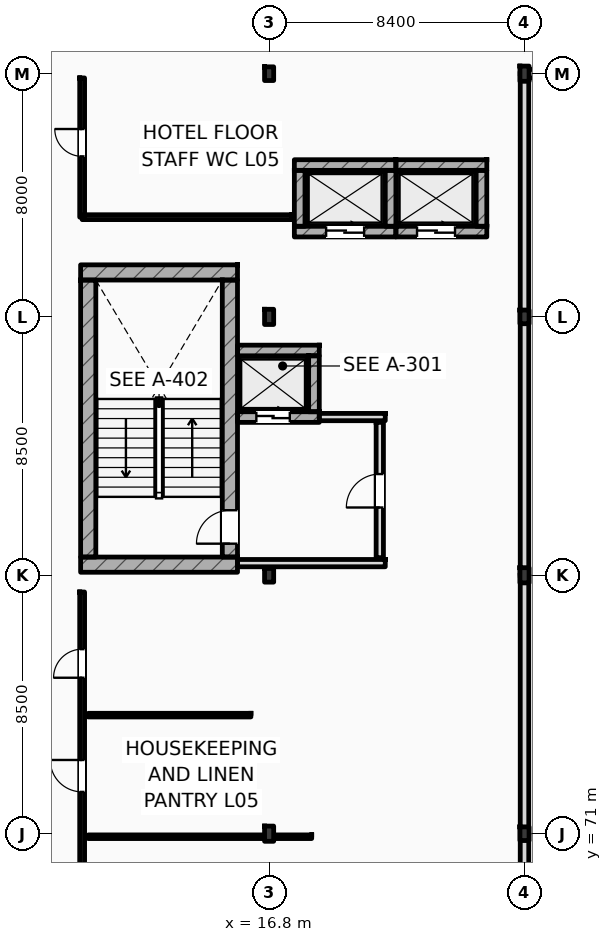
"""IFC4 building model, lengths in metres.
Left out: names, types, materials, properties, quantities, classifications, styles, units other than length and angle.
Written with IfcOpenShell. Run it as: python <this file> out.ifc"""

import sys

from ifc_helpers import new_model, si_unit, direction, frame, frame_2d, origin, origin_2d, place, context, subcontext, project, spatial, rectangle, i_section, extrude, element, fill, save


model = new_model("IFC4")
c1 = context("Model", 3, precision=1e-05, world=origin(), true_north=direction((0.0, 1.0)))
c2 = subcontext(c1, "Body", "Model", "MODEL_VIEW")
j1 = project(units=[si_unit("LENGTHUNIT", "METRE"), si_unit("PLANEANGLEUNIT", "RADIAN")], contexts=[c1])
p1 = place(None, origin())
s1 = spatial("IfcSite", under=j1, at=p1, CompositionType="ELEMENT")
p2 = place(p1, origin())
s2 = spatial("IfcBuilding", under=s1, at=p2, CompositionType="ELEMENT")
p3 = place(p2, frame((0.0, 0.0, 24.6)))
s3 = spatial("IfcBuildingStorey", under=s2, at=p3, CompositionType="ELEMENT", Elevation=24.6)
p4 = place(p3, frame((16.8, 71.0, 0.0), z_axis=(0.0, 0.0, 1.0), x_axis=(1.0, 0.0, 0.0)))
e1 = element("IfcColumn", 1, at=p4, inside=s3, PredefinedType="COLUMN", context=c2, shape_type="SweptSolid", body=[
    extrude(i_section(OverallWidth=0.3, OverallDepth=0.5, WebThickness=0.014, FlangeThickness=0.028, FilletRadius=0.027, at=origin_2d()), origin(), (0.0, 0.0, 1.0), 3.6),
])
p5 = place(p3, frame((16.8, 79.5, 0.0), z_axis=(0.0, 0.0, 1.0), x_axis=(1.0, 0.0, 0.0)))
e2 = element("IfcColumn", 2, at=p5, inside=s3, PredefinedType="COLUMN", context=c2, shape_type="SweptSolid", body=[
    extrude(i_section(OverallWidth=0.3, OverallDepth=0.45, WebThickness=0.014, FlangeThickness=0.026, FilletRadius=0.027, at=origin_2d()), origin(), (0.0, 0.0, 1.0), 3.6),
])
p6 = place(p3, frame((16.8, 88.0, 0.0), z_axis=(0.0, 0.0, 1.0), x_axis=(1.0, 0.0, 0.0)))
e3 = element("IfcColumn", 3, at=p6, inside=s3, PredefinedType="COLUMN", context=c2, shape_type="SweptSolid", body=[
    extrude(i_section(OverallWidth=0.3, OverallDepth=0.5, WebThickness=0.014, FlangeThickness=0.028, FilletRadius=0.027, at=origin_2d()), origin(), (0.0, 0.0, 1.0), 3.6),
])
for number, where, z_axis, x_axis in (
    (4, (16.8, 96.0, 0.0), (0.0, 0.0, 1.0), (1.0, 0.0, 0.0)),
    (5, (25.2, 71.0, 0.0), (0.0, 0.0, 1.0), (1.0, 0.0, 0.0)),
):
    element("IfcColumn", number, at=place(p3, frame(where, z_axis=z_axis, x_axis=x_axis)), inside=s3, PredefinedType="COLUMN", context=c2, shape_type="SweptSolid", body=[
        extrude(i_section(OverallWidth=0.3, OverallDepth=0.45, WebThickness=0.014, FlangeThickness=0.026, FilletRadius=0.027, at=origin_2d()), origin(), (0.0, 0.0, 1.0), 3.6),
    ])
p7 = place(p3, frame((25.2, 79.5, 0.0), z_axis=(0.0, 0.0, 1.0), x_axis=(1.0, 0.0, 0.0)))
e6 = element("IfcColumn", 6, at=p7, inside=s3, PredefinedType="COLUMN", context=c2, shape_type="SweptSolid", body=[
    extrude(i_section(OverallWidth=0.3, OverallDepth=0.5, WebThickness=0.014, FlangeThickness=0.028, FilletRadius=0.027, at=origin_2d()), origin(), (0.0, 0.0, 1.0), 3.6),
])
p8 = place(p3, frame((25.2, 88.0, 0.0), z_axis=(0.0, 0.0, 1.0), x_axis=(1.0, 0.0, 0.0)))
e7 = element("IfcColumn", 7, at=p8, inside=s3, PredefinedType="COLUMN", context=c2, shape_type="SweptSolid", body=[
    extrude(i_section(OverallWidth=0.3, OverallDepth=0.45, WebThickness=0.014, FlangeThickness=0.026, FilletRadius=0.027, at=origin_2d()), origin(), (0.0, 0.0, 1.0), 3.6),
])
p9 = place(p3, frame((25.2, 96.0, 0.0), z_axis=(0.0, 0.0, 1.0), x_axis=(1.0, 0.0, 0.0)))
e8 = element("IfcColumn", 8, at=p9, inside=s3, PredefinedType="COLUMN", context=c2, shape_type="SweptSolid", body=[
    extrude(i_section(OverallWidth=0.3, OverallDepth=0.5, WebThickness=0.014, FlangeThickness=0.028, FilletRadius=0.027, at=origin_2d()), origin(), (0.0, 0.0, 1.0), 3.6),
])
for number, where, z_axis, x_axis in (
    (9, (10.6, 89.462, 0.0), (0.0, 0.0, 1.0), (1.0, 0.0, 0.0)),
    (10, (10.6, 79.85, 0.0), (0.0, 0.0, 1.0), (1.0, 0.0, 0.0)),
):
    element("IfcWall", number, at=place(p3, frame(where, z_axis=z_axis, x_axis=x_axis)), inside=s3, PredefinedType="SHEAR", context=c2, shape_type="SweptSolid", body=[
        extrude(rectangle(XDim=5.16, YDim=0.5, at=frame_2d((2.58, 0.0))), origin(), (0.0, 0.0, 1.0), 3.6),
    ])
p10 = place(p3, frame((10.85, 80.1, 0.0), z_axis=(0.0, 0.0, 1.0), x_axis=(0.0, 1.0, 0.0)))
e11 = element("IfcWall", 11, at=p10, inside=s3, PredefinedType="SHEAR", context=c2, shape_type="SweptSolid", body=[
    extrude(rectangle(XDim=9.112, YDim=0.5, at=frame_2d((4.556, 0.0))), origin(), (0.0, 0.0, 1.0), 3.6),
])
p11 = place(p3, frame((15.51, 80.1, 0.0), z_axis=(0.0, 0.0, 1.0), x_axis=(0.0, 1.0, 0.0)))
e12 = element("IfcWall", 12, at=p11, inside=s3, PredefinedType="SHEAR", context=c2, shape_type="SweptSolid", body=[
    extrude(rectangle(XDim=9.112, YDim=0.5, at=frame_2d((4.556, 0.0))), origin(), (0.0, 0.0, 1.0), 3.6),
])
p12 = place(p11, frame((0.44, 0.0, 0.0)))
e13 = element("IfcOpeningElement", 13, at=p12, cuts=e12, PredefinedType="OPENING", context=c2, shape_type="SweptSolid", body=[
    extrude(rectangle(XDim=1.1, YDim=2.2, at=frame_2d((0.55, 1.1))), frame((0.0, 0.26, 0.0), z_axis=(0.0, -1.0, 0.0), x_axis=(1.0, 0.0, 0.0)), (0.0, 0.0, 1.0), 0.52),
])
p13 = place(p3, frame((25.2, 96.0, 0.0), z_axis=(0.0, 0.0, 1.0), x_axis=(1.0, 0.0, 0.0)))
e14 = element("IfcWall", 14, at=p13, inside=s3, PredefinedType="STANDARD", context=c2, shape_type="SweptSolid", body=[
    extrude(rectangle(XDim=94.8, YDim=0.28, at=frame_2d((47.4, 0.0))), origin(), (0.0, 0.0, 1.0), 2.78),
])
p14 = place(p13, frame((16.539, 0.0, 0.9)))
e15 = element("IfcOpeningElement", 15, at=p14, cuts=e14, PredefinedType="OPENING", context=c2, shape_type="SweptSolid", body=[
    extrude(rectangle(XDim=1.75, YDim=1.7, at=frame_2d((0.875, 0.85))), frame((0.0, 0.15, 0.0), z_axis=(0.0, -1.0, 0.0), x_axis=(1.0, 0.0, 0.0)), (0.0, 0.0, 1.0), 0.3),
])
p15 = place(p13, frame((20.367, 0.0, 0.9)))
e16 = element("IfcOpeningElement", 16, at=p15, cuts=e14, PredefinedType="OPENING", context=c2, shape_type="SweptSolid", body=[
    extrude(rectangle(XDim=2.0, YDim=1.7, at=frame_2d((1.0, 0.85))), frame((0.0, 0.15, 0.0), z_axis=(0.0, -1.0, 0.0), x_axis=(1.0, 0.0, 0.0)), (0.0, 0.0, 1.0), 0.3),
])
p16 = place(p13, frame((24.326, 0.0, 0.9)))
e17 = element("IfcOpeningElement", 17, at=p16, cuts=e14, PredefinedType="OPENING", context=c2, shape_type="SweptSolid", body=[
    extrude(rectangle(XDim=2.3, YDim=1.7, at=frame_2d((1.15, 0.85))), frame((0.0, 0.15, 0.0), z_axis=(0.0, -1.0, 0.0), x_axis=(1.0, 0.0, 0.0)), (0.0, 0.0, 1.0), 0.3),
])
p17 = place(p13, frame((27.684, 0.0, 0.9)))
e18 = element("IfcOpeningElement", 18, at=p17, cuts=e14, PredefinedType="OPENING", context=c2, shape_type="SweptSolid", body=[
    extrude(rectangle(XDim=2.6, YDim=1.7, at=frame_2d((1.3, 0.85))), frame((0.0, 0.15, 0.0), z_axis=(0.0, -1.0, 0.0), x_axis=(1.0, 0.0, 0.0)), (0.0, 0.0, 1.0), 0.3),
])
p18 = place(p13, frame((32.083, 0.0, 0.9)))
e19 = element("IfcOpeningElement", 19, at=p18, cuts=e14, PredefinedType="OPENING", context=c2, shape_type="SweptSolid", body=[
    extrude(rectangle(XDim=2.419, YDim=1.7, at=frame_2d((1.209, 0.85))), frame((0.0, 0.15, 0.0), z_axis=(0.0, -1.0, 0.0), x_axis=(1.0, 0.0, 0.0)), (0.0, 0.0, 1.0), 0.3),
])
p19 = place(p13, frame((35.322, 0.0, 0.9)))
e20 = element("IfcOpeningElement", 20, at=p19, cuts=e14, PredefinedType="OPENING", context=c2, shape_type="SweptSolid", body=[
    extrude(rectangle(XDim=2.868, YDim=1.7, at=frame_2d((1.434, 0.85))), frame((0.0, 0.15, 0.0), z_axis=(0.0, -1.0, 0.0), x_axis=(1.0, 0.0, 0.0)), (0.0, 0.0, 1.0), 0.3),
])
p20 = place(p13, frame((56.015, 0.0, 0.9)))
e21 = element("IfcOpeningElement", 21, at=p20, cuts=e14, PredefinedType="OPENING", context=c2, shape_type="SweptSolid", body=[
    extrude(rectangle(XDim=1.2, YDim=1.7, at=frame_2d((0.6, 0.85))), frame((0.0, 0.15, 0.0), z_axis=(0.0, -1.0, 0.0), x_axis=(1.0, 0.0, 0.0)), (0.0, 0.0, 1.0), 0.3),
])
p21 = place(p13, frame((59.888, 0.0, 0.9)))
e22 = element("IfcOpeningElement", 22, at=p21, cuts=e14, PredefinedType="OPENING", context=c2, shape_type="SweptSolid", body=[
    extrude(rectangle(XDim=1.35, YDim=1.7, at=frame_2d((0.675, 0.85))), frame((0.0, 0.15, 0.0), z_axis=(0.0, -1.0, 0.0), x_axis=(1.0, 0.0, 0.0)), (0.0, 0.0, 1.0), 0.3),
])
p22 = place(p13, frame((63.799, 0.0, 0.9)))
e23 = element("IfcOpeningElement", 23, at=p22, cuts=e14, PredefinedType="OPENING", context=c2, shape_type="SweptSolid", body=[
    extrude(rectangle(XDim=1.5, YDim=1.7, at=frame_2d((0.75, 0.85))), frame((0.0, 0.15, 0.0), z_axis=(0.0, -1.0, 0.0), x_axis=(1.0, 0.0, 0.0)), (0.0, 0.0, 1.0), 0.3),
])
p23 = place(p13, frame((67.709, 0.0, 0.9)))
e24 = element("IfcOpeningElement", 24, at=p23, cuts=e14, PredefinedType="OPENING", context=c2, shape_type="SweptSolid", body=[
    extrude(rectangle(XDim=1.65, YDim=1.7, at=frame_2d((0.825, 0.85))), frame((0.0, 0.15, 0.0), z_axis=(0.0, -1.0, 0.0), x_axis=(1.0, 0.0, 0.0)), (0.0, 0.0, 1.0), 0.3),
])
p24 = place(p13, frame((71.618, 0.0, 0.9)))
e25 = element("IfcOpeningElement", 25, at=p24, cuts=e14, PredefinedType="OPENING", context=c2, shape_type="SweptSolid", body=[
    extrude(rectangle(XDim=1.8, YDim=1.7, at=frame_2d((0.9, 0.85))), frame((0.0, 0.15, 0.0), z_axis=(0.0, -1.0, 0.0), x_axis=(1.0, 0.0, 0.0)), (0.0, 0.0, 1.0), 0.3),
])
p25 = place(p13, frame((75.129, 0.0, 0.9)))
e26 = element("IfcOpeningElement", 26, at=p25, cuts=e14, PredefinedType="OPENING", context=c2, shape_type="SweptSolid", body=[
    extrude(rectangle(XDim=1.95, YDim=1.7, at=frame_2d((0.975, 0.85))), frame((0.0, 0.15, 0.0), z_axis=(0.0, -1.0, 0.0), x_axis=(1.0, 0.0, 0.0)), (0.0, 0.0, 1.0), 0.3),
])
p26 = place(p13, frame((79.439, 0.0, 0.9)))
e27 = element("IfcOpeningElement", 27, at=p26, cuts=e14, PredefinedType="OPENING", context=c2, shape_type="SweptSolid", body=[
    extrude(rectangle(XDim=2.1, YDim=1.7, at=frame_2d((1.05, 0.85))), frame((0.0, 0.15, 0.0), z_axis=(0.0, -1.0, 0.0), x_axis=(1.0, 0.0, 0.0)), (0.0, 0.0, 1.0), 0.3),
])
p27 = place(p13, frame((83.349, 0.0, 0.9)))
e28 = element("IfcOpeningElement", 28, at=p27, cuts=e14, PredefinedType="OPENING", context=c2, shape_type="SweptSolid", body=[
    extrude(rectangle(XDim=2.25, YDim=1.7, at=frame_2d((1.125, 0.85))), frame((0.0, 0.15, 0.0), z_axis=(0.0, -1.0, 0.0), x_axis=(1.0, 0.0, 0.0)), (0.0, 0.0, 1.0), 0.3),
])
p28 = place(p13, frame((87.258, 0.0, 0.9)))
e29 = element("IfcOpeningElement", 29, at=p28, cuts=e14, PredefinedType="OPENING", context=c2, shape_type="SweptSolid", body=[
    extrude(rectangle(XDim=2.4, YDim=1.7, at=frame_2d((1.2, 0.85))), frame((0.0, 0.15, 0.0), z_axis=(0.0, -1.0, 0.0), x_axis=(1.0, 0.0, 0.0)), (0.0, 0.0, 1.0), 0.3),
])
p29 = place(p13, frame((91.204, 0.0, 0.9)))
e30 = element("IfcOpeningElement", 30, at=p29, cuts=e14, PredefinedType="OPENING", context=c2, shape_type="SweptSolid", body=[
    extrude(rectangle(XDim=2.55, YDim=1.7, at=frame_2d((1.275, 0.85))), frame((0.0, 0.15, 0.0), z_axis=(0.0, -1.0, 0.0), x_axis=(1.0, 0.0, 0.0)), (0.0, 0.0, 1.0), 0.3),
])
p30 = place(p3, frame((25.2, 62.5, 0.0), z_axis=(0.0, 0.0, 1.0), x_axis=(0.0, 1.0, 0.0)))
e31 = element("IfcWall", 31, at=p30, inside=s3, PredefinedType="STANDARD", context=c2, shape_type="SweptSolid", body=[
    extrude(rectangle(XDim=17.0, YDim=0.28, at=frame_2d((8.5, 0.0))), origin(), (0.0, 0.0, 1.0), 2.93),
])
p31 = place(p3, frame((25.2, 79.5, 0.0), z_axis=(0.0, 0.0, 1.0), x_axis=(0.0, 1.0, 0.0)))
e32 = element("IfcWall", 32, at=p31, inside=s3, PredefinedType="STANDARD", context=c2, shape_type="SweptSolid", body=[
    extrude(rectangle(XDim=16.5, YDim=0.28, at=frame_2d((8.25, 0.0))), origin(), (0.0, 0.0, 1.0), 2.93),
])
p32 = place(p3, frame((15.76, 86.895, 0.0), z_axis=(0.0, 0.0, 1.0), x_axis=(1.0, 0.0, 0.0)))
e33 = element("IfcWall", 33, at=p32, inside=s3, PredefinedType="SHEAR", context=c2, shape_type="SweptSolid", body=[
    extrude(rectangle(XDim=2.69, YDim=0.35, at=frame_2d((1.345, 0.0))), origin(), (0.0, 0.0, 1.0), 3.34),
])
p33 = place(p3, frame((15.76, 84.705, 0.0), z_axis=(0.0, 0.0, 1.0), x_axis=(1.0, 0.0, 0.0)))
e34 = element("IfcWall", 34, at=p33, inside=s3, PredefinedType="SHEAR", context=c2, shape_type="SweptSolid", body=[
    extrude(rectangle(XDim=2.69, YDim=0.35, at=frame_2d((1.345, 0.0))), origin(), (0.0, 0.0, 1.0), 3.34),
])
p34 = place(p33, frame((0.62, 0.0, 0.0)))
e35 = element("IfcOpeningElement", 35, at=p34, cuts=e34, PredefinedType="OPENING", context=c2, shape_type="SweptSolid", body=[
    extrude(rectangle(XDim=1.1, YDim=2.2, at=frame_2d((0.55, 1.1))), frame((0.0, 0.185, 0.0), z_axis=(0.0, -1.0, 0.0), x_axis=(1.0, 0.0, 0.0)), (0.0, 0.0, 1.0), 0.37),
])
p35 = place(p3, frame((18.275, 84.88, 0.0), z_axis=(0.0, 0.0, 1.0), x_axis=(0.0, 1.0, 0.0)))
e36 = element("IfcWall", 36, at=p35, inside=s3, PredefinedType="SHEAR", context=c2, shape_type="SweptSolid", body=[
    extrude(rectangle(XDim=1.84, YDim=0.35, at=frame_2d((0.92, 0.0))), origin(), (0.0, 0.0, 1.0), 3.34),
])
p36 = place(p3, frame((17.63, 92.995, 0.0), z_axis=(0.0, 0.0, 1.0), x_axis=(1.0, 0.0, 0.0)))
e37 = element("IfcWall", 37, at=p36, inside=s3, PredefinedType="SHEAR", context=c2, shape_type="SweptSolid", body=[
    extrude(rectangle(XDim=3.34, YDim=0.35, at=frame_2d((1.67, 0.0))), origin(), (0.0, 0.0, 1.0), 3.34),
])
p37 = place(p3, frame((17.63, 90.805, 0.0), z_axis=(0.0, 0.0, 1.0), x_axis=(1.0, 0.0, 0.0)))
e38 = element("IfcWall", 38, at=p37, inside=s3, PredefinedType="SHEAR", context=c2, shape_type="SweptSolid", body=[
    extrude(rectangle(XDim=3.34, YDim=0.35, at=frame_2d((1.67, 0.0))), origin(), (0.0, 0.0, 1.0), 3.34),
])
p38 = place(p37, frame((1.045, 0.0, 0.0)))
e39 = element("IfcOpeningElement", 39, at=p38, cuts=e38, PredefinedType="OPENING", context=c2, shape_type="SweptSolid", body=[
    extrude(rectangle(XDim=1.25, YDim=2.25, at=frame_2d((0.625, 1.125))), frame((0.0, 0.185, 0.0), z_axis=(0.0, -1.0, 0.0), x_axis=(1.0, 0.0, 0.0)), (0.0, 0.0, 1.0), 0.37),
])
for number, where, z_axis, x_axis in (
    (40, (17.805, 90.98, 0.0), (0.0, 0.0, 1.0), (0.0, 1.0, 0.0)),
    (41, (20.795, 90.98, 0.0), (0.0, 0.0, 1.0), (0.0, 1.0, 0.0)),
):
    element("IfcWall", number, at=place(p3, frame(where, z_axis=z_axis, x_axis=x_axis)), inside=s3, PredefinedType="SHEAR", context=c2, shape_type="SweptSolid", body=[
        extrude(rectangle(XDim=1.84, YDim=0.35, at=frame_2d((0.92, 0.0))), origin(), (0.0, 0.0, 1.0), 3.34),
    ])
p39 = place(p3, frame((20.97, 92.995, 0.0), z_axis=(0.0, 0.0, 1.0), x_axis=(1.0, 0.0, 0.0)))
e42 = element("IfcWall", 42, at=p39, inside=s3, PredefinedType="SHEAR", context=c2, shape_type="SweptSolid", body=[
    extrude(rectangle(XDim=2.99, YDim=0.35, at=frame_2d((1.495, 0.0))), origin(), (0.0, 0.0, 1.0), 3.34),
])
p40 = place(p3, frame((20.97, 90.805, 0.0), z_axis=(0.0, 0.0, 1.0), x_axis=(1.0, 0.0, 0.0)))
e43 = element("IfcWall", 43, at=p40, inside=s3, PredefinedType="SHEAR", context=c2, shape_type="SweptSolid", body=[
    extrude(rectangle(XDim=2.99, YDim=0.35, at=frame_2d((1.495, 0.0))), origin(), (0.0, 0.0, 1.0), 3.34),
])
p41 = place(p40, frame((0.695, 0.0, 0.0)))
e44 = element("IfcOpeningElement", 44, at=p41, cuts=e43, PredefinedType="OPENING", context=c2, shape_type="SweptSolid", body=[
    extrude(rectangle(XDim=1.25, YDim=2.25, at=frame_2d((0.625, 1.125))), frame((0.0, 0.185, 0.0), z_axis=(0.0, -1.0, 0.0), x_axis=(1.0, 0.0, 0.0)), (0.0, 0.0, 1.0), 0.37),
])
p42 = place(p3, frame((23.785, 90.98, 0.0), z_axis=(0.0, 0.0, 1.0), x_axis=(0.0, 1.0, 0.0)))
e45 = element("IfcWall", 45, at=p42, inside=s3, PredefinedType="SHEAR", context=c2, shape_type="SweptSolid", body=[
    extrude(rectangle(XDim=1.84, YDim=0.35, at=frame_2d((0.92, 0.0))), origin(), (0.0, 0.0, 1.0), 3.34),
])
p43 = place(p3, frame((15.76, 79.9, 0.0), z_axis=(0.0, 0.0, 1.0), x_axis=(1.0, 0.0, 0.0)))
e46 = element("IfcWall", 46, at=p43, inside=s3, PredefinedType="STANDARD", context=c2, shape_type="SweptSolid", body=[
    extrude(rectangle(XDim=4.86, YDim=0.24, at=frame_2d((2.43, 0.0))), origin(), (0.0, 0.0, 1.0), 3.34),
])
p44 = place(p3, frame((18.45, 84.705, 0.0), z_axis=(0.0, 0.0, 1.0), x_axis=(1.0, 0.0, 0.0)))
e47 = element("IfcWall", 47, at=p44, inside=s3, PredefinedType="STANDARD", context=c2, shape_type="SweptSolid", body=[
    extrude(rectangle(XDim=2.17, YDim=0.24, at=frame_2d((1.085, 0.0))), origin(), (0.0, 0.0, 1.0), 3.34),
])
p45 = place(p3, frame((20.44, 80.08, 0.0), z_axis=(0.0, 0.0, 1.0), x_axis=(0.0, 1.0, 0.0)))
e48 = element("IfcWall", 48, at=p45, inside=s3, PredefinedType="STANDARD", context=c2, shape_type="SweptSolid", body=[
    extrude(rectangle(XDim=4.45, YDim=0.24, at=frame_2d((2.225, 0.0))), origin(), (0.0, 0.0, 1.0), 3.34),
])
p46 = place(p45, frame((1.65, 0.0, 0.0)))
e49 = element("IfcOpeningElement", 49, at=p46, cuts=e48, PredefinedType="OPENING", context=c2, shape_type="SweptSolid", body=[
    extrude(rectangle(XDim=1.1, YDim=2.2, at=frame_2d((0.55, 1.1))), frame((0.0, 0.13, 0.0), z_axis=(0.0, -1.0, 0.0), x_axis=(1.0, 0.0, 0.0)), (0.0, 0.0, 1.0), 0.26),
])
p47 = place(p3, frame((10.65, 62.64, 0.0), z_axis=(0.0, 0.0, 1.0), x_axis=(0.0, 1.0, 0.0)))
e50 = element("IfcWall", 50, at=p47, inside=s3, PredefinedType="PARTITIONING", context=c2, shape_type="SweptSolid", body=[
    extrude(rectangle(XDim=16.31, YDim=0.16, at=frame_2d((8.155, 0.0))), origin(), (0.0, 0.0, 1.0), 3.34),
])
p48 = place(p47, frame((3.61, 0.0, 0.0)))
e51 = element("IfcOpeningElement", 51, at=p48, cuts=e50, PredefinedType="OPENING", context=c2, shape_type="SweptSolid", body=[
    extrude(rectangle(XDim=1.3, YDim=2.2, at=frame_2d((0.65, 1.1))), frame((0.0, 0.09, 0.0), z_axis=(0.0, -1.0, 0.0), x_axis=(1.0, 0.0, 0.0)), (0.0, 0.0, 1.0), 0.18),
])
p49 = place(p47, frame((9.735, 0.0, 0.0)))
e52 = element("IfcOpeningElement", 52, at=p49, cuts=e50, PredefinedType="OPENING", context=c2, shape_type="SweptSolid", body=[
    extrude(rectangle(XDim=1.05, YDim=2.12, at=frame_2d((0.525, 1.06))), frame((0.0, 0.09, 0.0), z_axis=(0.0, -1.0, 0.0), x_axis=(1.0, 0.0, 0.0)), (0.0, 0.0, 1.0), 0.18),
])
p50 = place(p47, frame((13.49, 0.0, 0.0)))
e53 = element("IfcOpeningElement", 53, at=p50, cuts=e50, PredefinedType="OPENING", context=c2, shape_type="SweptSolid", body=[
    extrude(rectangle(XDim=0.94, YDim=2.15, at=frame_2d((0.47, 1.075))), frame((0.0, 0.09, 0.0), z_axis=(0.0, -1.0, 0.0), x_axis=(1.0, 0.0, 0.0)), (0.0, 0.0, 1.0), 0.18),
])
p51 = place(p3, frame((10.65, 91.28, 0.0), z_axis=(0.0, 0.0, 1.0), x_axis=(0.0, 1.0, 0.0)))
e54 = element("IfcWall", 54, at=p51, inside=s3, PredefinedType="PARTITIONING", context=c2, shape_type="SweptSolid", body=[
    extrude(rectangle(XDim=4.58, YDim=0.16, at=frame_2d((2.29, 0.0))), origin(), (0.0, 0.0, 1.0), 3.34),
])
p52 = place(p51, frame((2.0, 0.0, 0.0)))
e55 = element("IfcOpeningElement", 55, at=p52, cuts=e54, PredefinedType="OPENING", context=c2, shape_type="SweptSolid", body=[
    extrude(rectangle(XDim=0.9, YDim=2.1, at=frame_2d((0.45, 1.05))), frame((0.0, 0.09, 0.0), z_axis=(0.0, -1.0, 0.0), x_axis=(1.0, 0.0, 0.0)), (0.0, 0.0, 1.0), 0.18),
])
p53 = place(p3, frame((10.65, 91.28, 0.0), z_axis=(0.0, 0.0, 1.0), x_axis=(1.0, 0.0, 0.0)))
e56 = element("IfcWall", 56, at=p53, inside=s3, PredefinedType="PARTITIONING", context=c2, shape_type="SweptSolid", body=[
    extrude(rectangle(XDim=6.9, YDim=0.16, at=frame_2d((3.45, 0.0))), origin(), (0.0, 0.0, 1.0), 3.34),
])
p54 = place(p3, frame((10.85, 70.9, 0.0), z_axis=(0.0, 0.0, 1.0), x_axis=(1.0, 0.0, 0.0)))
e57 = element("IfcWall", 57, at=p54, inside=s3, PredefinedType="PARTITIONING", context=c2, shape_type="SweptSolid", body=[
    extrude(rectangle(XDim=7.35, YDim=0.12, at=frame_2d((3.675, 0.0))), origin(), (0.0, 0.0, 1.0), 2.78),
])
p55 = place(p3, frame((10.85, 74.9, 0.0), z_axis=(0.0, 0.0, 1.0), x_axis=(1.0, 0.0, 0.0)))
e58 = element("IfcWall", 58, at=p55, inside=s3, PredefinedType="PARTITIONING", context=c2, shape_type="SweptSolid", body=[
    extrude(rectangle(XDim=5.35, YDim=0.12, at=frame_2d((2.675, 0.0))), origin(), (0.0, 0.0, 1.0), 3.34),
])
p56 = place(p12, origin())
e59 = element("IfcDoor", 59, at=p56, inside=s3, OperationType="SINGLE_SWING_LEFT", PredefinedType="DOOR", context=c2, shape_type="SweptSolid", body=[
    extrude(rectangle(XDim=1.1, YDim=2.2, at=frame_2d((0.55, 1.1))), frame((0.0, 0.025, 0.0), z_axis=(0.0, -1.0, 0.0), x_axis=(1.0, 0.0, 0.0)), (0.0, 0.0, 1.0), 0.05),
])
fill(e13, e59)
p57 = place(p34, origin())
e60 = element("IfcDoor", 60, at=p57, inside=s3, OperationType="SLIDING_TO_LEFT", PredefinedType="DOOR", context=c2, shape_type="SweptSolid", body=[
    extrude(rectangle(XDim=1.1, YDim=2.2, at=frame_2d((0.55, 1.1))), frame((0.0, 0.025, 0.0), z_axis=(0.0, -1.0, 0.0), x_axis=(1.0, 0.0, 0.0)), (0.0, 0.0, 1.0), 0.05),
])
fill(e35, e60)
p58 = place(p38, origin())
e61 = element("IfcDoor", 61, at=p58, inside=s3, OperationType="SLIDING_TO_LEFT", PredefinedType="DOOR", context=c2, shape_type="SweptSolid", body=[
    extrude(rectangle(XDim=1.25, YDim=2.25, at=frame_2d((0.625, 1.125))), frame((0.0, 0.025, 0.0), z_axis=(0.0, -1.0, 0.0), x_axis=(1.0, 0.0, 0.0)), (0.0, 0.0, 1.0), 0.05),
])
fill(e39, e61)
p59 = place(p41, origin())
e62 = element("IfcDoor", 62, at=p59, inside=s3, OperationType="SLIDING_TO_LEFT", PredefinedType="DOOR", context=c2, shape_type="SweptSolid", body=[
    extrude(rectangle(XDim=1.25, YDim=2.25, at=frame_2d((0.625, 1.125))), frame((0.0, 0.025, 0.0), z_axis=(0.0, -1.0, 0.0), x_axis=(1.0, 0.0, 0.0)), (0.0, 0.0, 1.0), 0.05),
])
fill(e44, e62)
p60 = place(p46, origin())
e63 = element("IfcDoor", 63, at=p60, inside=s3, OperationType="SINGLE_SWING_LEFT", PredefinedType="DOOR", context=c2, shape_type="SweptSolid", body=[
    extrude(rectangle(XDim=1.1, YDim=2.2, at=frame_2d((0.55, 1.1))), frame((0.0, 0.025, 0.0), z_axis=(0.0, -1.0, 0.0), x_axis=(1.0, 0.0, 0.0)), (0.0, 0.0, 1.0), 0.05),
])
fill(e49, e63)
p61 = place(p49, origin())
e64 = element("IfcDoor", 64, at=p61, inside=s3, OperationType="SINGLE_SWING_RIGHT", PredefinedType="DOOR", context=c2, shape_type="SweptSolid", body=[
    extrude(rectangle(XDim=1.05, YDim=2.12, at=frame_2d((0.525, 1.06))), frame((0.0, 0.025, 0.0), z_axis=(0.0, -1.0, 0.0), x_axis=(1.0, 0.0, 0.0)), (0.0, 0.0, 1.0), 0.05),
])
fill(e52, e64)
p62 = place(p50, origin())
e65 = element("IfcDoor", 65, at=p62, inside=s3, OperationType="SINGLE_SWING_LEFT", PredefinedType="DOOR", context=c2, shape_type="SweptSolid", body=[
    extrude(rectangle(XDim=0.94, YDim=2.15, at=frame_2d((0.47, 1.075))), frame((0.0, 0.025, 0.0), z_axis=(0.0, -1.0, 0.0), x_axis=(1.0, 0.0, 0.0)), (0.0, 0.0, 1.0), 0.05),
])
fill(e53, e65)
p63 = place(p52, origin())
e66 = element("IfcDoor", 66, at=p63, inside=s3, OperationType="SINGLE_SWING_RIGHT", PredefinedType="DOOR", context=c2, shape_type="SweptSolid", body=[
    extrude(rectangle(XDim=0.9, YDim=2.1, at=frame_2d((0.45, 1.05))), frame((0.0, 0.025, 0.0), z_axis=(0.0, -1.0, 0.0), x_axis=(1.0, 0.0, 0.0)), (0.0, 0.0, 1.0), 0.05),
])
fill(e55, e66)
save(model, sys.argv[1])
